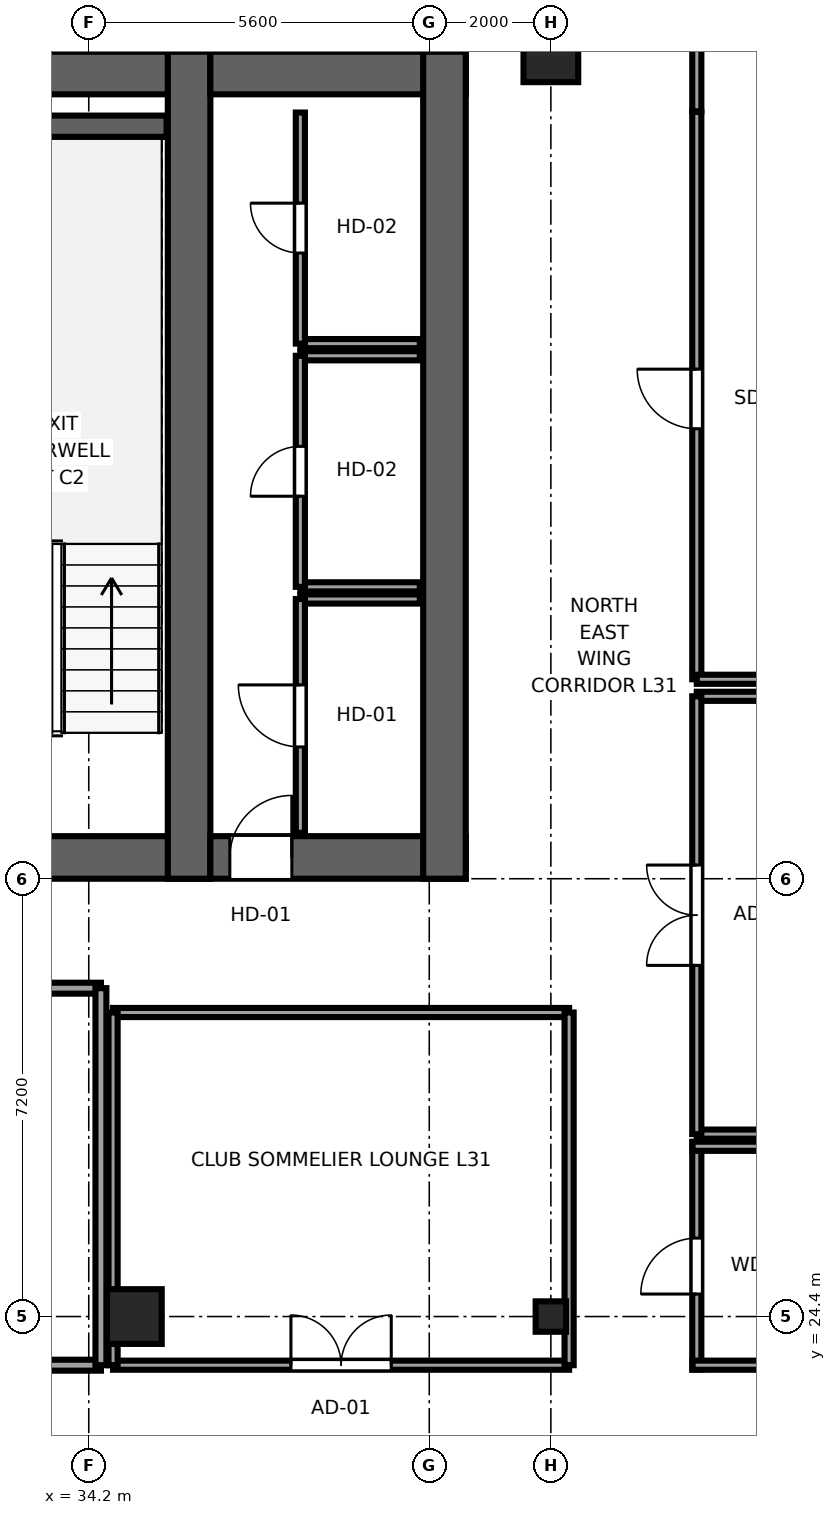
"""IFC4 building model, lengths in metres.
Left out: names, types, materials, properties, quantities, classifications, styles, units other than length and angle.
Written with IfcOpenShell. Run it as: python <this file> out.ifc"""

import sys

from ifc_helpers import new_model, si_unit, direction, frame, frame_2d, origin, origin_2d, place, context, subcontext, project, spatial, rectangle, i_section, extrude, source, transform, mapped, element, fill, save


model = new_model("IFC4")
c1 = context("Model", 3, precision=1e-05, world=origin(), true_north=direction((0.0, 1.0)))
c2 = subcontext(c1, "Body", "Model", "MODEL_VIEW")
j1 = project(units=[si_unit("LENGTHUNIT", "METRE"), si_unit("PLANEANGLEUNIT", "RADIAN")], contexts=[c1])
p1 = place(None, origin())
s1 = spatial("IfcSite", under=j1, at=p1, CompositionType="ELEMENT")
p2 = place(p1, origin())
s2 = spatial("IfcBuilding", under=s1, at=p2, CompositionType="ELEMENT")
p3 = place(p2, frame((0.0, 0.0, 122.2)))
s3 = spatial("IfcBuildingStorey", under=s2, at=p3, CompositionType="ELEMENT", Elevation=122.2)
p4 = place(p3, frame((9.8, 31.95, 0.0), z_axis=(0.0, 0.0, 1.0), x_axis=(1.0, 0.0, 0.0)))
e1 = element("IfcWall", 1, at=p4, inside=s3, PredefinedType="SHEAR", context=c2, shape_type="SweptSolid", body=[
    extrude(rectangle(XDim=26.4, YDim=0.7, at=frame_2d((13.2, 0.0))), origin(), (0.0, 0.0, 1.0), 3.55),
])
p5 = place(p4, frame((6.32, 0.0, 0.0), z_axis=(0.0, 0.0, 1.0), x_axis=(-1.0, 0.0, 0.0)))
e2 = element("IfcOpeningElement", 2, at=p5, cuts=e1, PredefinedType="OPENING", context=c2, shape_type="SweptSolid", body=[
    extrude(rectangle(XDim=1.5, YDim=2.04, at=frame_2d((0.75, 1.02))), frame((0.0, 0.36, 0.0), z_axis=(0.0, -1.0, 0.0), x_axis=(1.0, 0.0, 0.0)), (0.0, 0.0, 1.0), 0.72),
])
p6 = place(p4, frame((13.95, 0.0, 0.0), z_axis=(0.0, 0.0, 1.0), x_axis=(-1.0, 0.0, 0.0)))
e3 = element("IfcOpeningElement", 3, at=p6, cuts=e1, PredefinedType="OPENING", context=c2, shape_type="SweptSolid", body=[
    extrude(rectangle(XDim=1.5, YDim=2.04, at=frame_2d((0.75, 1.02))), frame((0.0, 0.36, 0.0), z_axis=(0.0, -1.0, 0.0), x_axis=(1.0, 0.0, 0.0)), (0.0, 0.0, 1.0), 0.72),
])
p7 = place(p4, frame((20.25, 0.0, 0.0), z_axis=(0.0, 0.0, 1.0), x_axis=(-1.0, 0.0, 0.0)))
e4 = element("IfcOpeningElement", 4, at=p7, cuts=e1, PredefinedType="OPENING", context=c2, shape_type="SweptSolid", body=[
    extrude(rectangle(XDim=1.5, YDim=2.04, at=frame_2d((0.75, 1.02))), frame((0.0, 0.36, 0.0), z_axis=(0.0, -1.0, 0.0), x_axis=(1.0, 0.0, 0.0)), (0.0, 0.0, 1.0), 0.72),
])
p8 = place(p4, frame((8.37, 0.0, 0.0), z_axis=(0.0, 0.0, 1.0), x_axis=(-1.0, 0.0, 0.0)))
e5 = element("IfcOpeningElement", 5, at=p8, cuts=e1, PredefinedType="OPENING", context=c2, shape_type="SweptSolid", body=[
    extrude(rectangle(XDim=0.82, YDim=2.01, at=frame_2d((0.41, 1.005))), frame((0.0, 0.36, 0.0), z_axis=(0.0, -1.0, 0.0), x_axis=(1.0, 0.0, 0.0)), (0.0, 0.0, 1.0), 0.72),
])
p9 = place(p3, frame((9.8, 44.85, 0.0), z_axis=(0.0, 0.0, 1.0), x_axis=(1.0, 0.0, 0.0)))
e6 = element("IfcWall", 6, at=p9, inside=s3, PredefinedType="SHEAR", context=c2, shape_type="SweptSolid", body=[
    extrude(rectangle(XDim=26.4, YDim=0.7, at=frame_2d((13.2, 0.0))), origin(), (0.0, 0.0, 1.0), 3.55),
])
p10 = place(p3, frame((35.85, 31.6, 0.0), z_axis=(0.0, 0.0, 1.0), x_axis=(0.0, 1.0, 0.0)))
e7 = element("IfcWall", 7, at=p10, inside=s3, PredefinedType="SHEAR", context=c2, shape_type="SweptSolid", body=[
    extrude(rectangle(XDim=13.6, YDim=0.7, at=frame_2d((6.8, 0.0))), origin(), (0.0, 0.0, 1.0), 3.55),
])
p11 = place(p3, frame((36.2, 31.95, 0.0), z_axis=(0.0, 0.0, 1.0), x_axis=(1.0, 0.0, 0.0)))
e8 = element("IfcWall", 8, at=p11, inside=s3, PredefinedType="SHEAR", context=c2, shape_type="SweptSolid", body=[
    extrude(rectangle(XDim=4.2, YDim=0.7, at=frame_2d((2.1, 0.0))), origin(), (0.0, 0.0, 1.0), 3.55),
])
p12 = place(p11, frame((1.34, 0.0, 0.0), z_axis=(0.0, 0.0, 1.0), x_axis=(-1.0, 0.0, 0.0)))
e9 = element("IfcOpeningElement", 9, at=p12, cuts=e8, PredefinedType="OPENING", context=c2, shape_type="SweptSolid", body=[
    extrude(rectangle(XDim=1.02, YDim=2.03, at=frame_2d((0.51, 1.015))), frame((0.0, 0.36, 0.0), z_axis=(0.0, -1.0, 0.0), x_axis=(1.0, 0.0, 0.0)), (0.0, 0.0, 1.0), 0.72),
])
p13 = place(p3, frame((36.2, 44.85, 0.0), z_axis=(0.0, 0.0, 1.0), x_axis=(1.0, 0.0, 0.0)))
e10 = element("IfcWall", 10, at=p13, inside=s3, PredefinedType="SHEAR", context=c2, shape_type="SweptSolid", body=[
    extrude(rectangle(XDim=4.2, YDim=0.7, at=frame_2d((2.1, 0.0))), origin(), (0.0, 0.0, 1.0), 3.55),
])
p14 = place(p3, frame((40.05, 31.6, 0.0), z_axis=(0.0, 0.0, 1.0), x_axis=(0.0, 1.0, 0.0)))
e11 = element("IfcWall", 11, at=p14, inside=s3, PredefinedType="SHEAR", context=c2, shape_type="SweptSolid", body=[
    extrude(rectangle(XDim=13.6, YDim=0.7, at=frame_2d((6.8, 0.0))), origin(), (0.0, 0.0, 1.0), 3.55),
])
p15 = place(p3, frame((31.88, 43.975, 0.0), z_axis=(0.0, 0.0, 1.0), x_axis=(1.0, 0.0, 0.0)))
e12 = element("IfcWall", 12, at=p15, inside=s3, PredefinedType="SHEAR", context=c2, shape_type="SweptSolid", body=[
    extrude(rectangle(XDim=3.6, YDim=0.35, at=frame_2d((1.8, 0.0))), origin(), (0.0, 0.0, 1.0), 3.55),
])
m1 = source(origin(), c2, "Body", "SweptSolid", [
    extrude(rectangle(XDim=0.9, YDim=0.9, at=origin_2d()), origin(), (0.0, 0.0, 1.0), 3.55),
])
p16 = place(p3, frame((34.95, 24.4, 0.0), z_axis=(0.0, 0.0, 1.0), x_axis=(1.0, 0.0, 0.0)))
e13 = element("IfcColumn", 13, at=p16, inside=s3, PredefinedType="COLUMN", context=c2, shape_type="MappedRepresentation", body=[
    mapped(m1, transform((0.0, 0.0, 0.0), x_axis=(1.0, 0.0, 0.0), y_axis=(0.0, 1.0, 0.0), z_axis=(0.0, 0.0, 1.0), scale=1.0)),
])
m2 = source(origin(), c2, "Body", "SweptSolid", [
    extrude(i_section(OverallWidth=0.5, OverallDepth=0.5, WebThickness=0.022, FlangeThickness=0.034, at=origin_2d()), origin(), (0.0, 0.0, 1.0), 3.55),
])
p17 = place(p3, frame((41.8, 24.4, 0.0), z_axis=(0.0, 0.0, 1.0), x_axis=(1.0, 0.0, 0.0)))
e14 = element("IfcColumn", 14, at=p17, inside=s3, PredefinedType="COLUMN", context=c2, shape_type="MappedRepresentation", body=[
    mapped(m2, transform((0.0, 0.0, 0.0), x_axis=(1.0, 0.0, 0.0), y_axis=(0.0, 1.0, 0.0), z_axis=(0.0, 0.0, 1.0), scale=1.0)),
])
p18 = place(p3, frame((41.8, 45.15, 0.0), z_axis=(0.0, 0.0, 1.0), x_axis=(1.0, 0.0, 0.0)))
e15 = element("IfcColumn", 15, at=p18, inside=s3, PredefinedType="COLUMN", context=c2, shape_type="MappedRepresentation", body=[
    mapped(m1, transform((0.0, 0.0, 0.0), x_axis=(1.0, 0.0, 0.0), y_axis=(0.0, 1.0, 0.0), z_axis=(0.0, 0.0, 1.0), scale=1.0)),
])
p19 = place(p3, frame((37.68, 36.2, 0.0), z_axis=(0.0, 0.0, 1.0), x_axis=(1.0, 0.0, 0.0)))
e16 = element("IfcWall", 16, at=p19, inside=s3, PredefinedType="PARTITIONING", context=c2, shape_type="SweptSolid", body=[
    extrude(rectangle(XDim=1.965, YDim=0.15, at=frame_2d((0.982, 0.0))), origin(), (0.0, 0.0, 1.0), 3.37),
])
p20 = place(p3, frame((37.68, 32.355, 0.0), z_axis=(0.0, 0.0, 1.0), x_axis=(0.0, 1.0, 0.0)))
e17 = element("IfcWall", 17, at=p20, inside=s3, PredefinedType="PARTITIONING", context=c2, shape_type="SweptSolid", body=[
    extrude(rectangle(XDim=3.845, YDim=0.15, at=frame_2d((1.922, 0.0))), origin(), (0.0, 0.0, 1.0), 3.37),
])
p21 = place(p20, frame((1.413, 0.0, 0.0)))
e18 = element("IfcOpeningElement", 18, at=p21, cuts=e17, PredefinedType="OPENING", context=c2, shape_type="SweptSolid", body=[
    extrude(rectangle(XDim=1.02, YDim=2.03, at=frame_2d((0.51, 1.015))), frame((0.0, 0.085, 0.0), z_axis=(0.0, -1.0, 0.0), x_axis=(1.0, 0.0, 0.0)), (0.0, 0.0, 1.0), 0.17),
])
for number, where, z_axis, x_axis in (
    (19, (37.68, 36.4, 0.0), (0.0, 0.0, 1.0), (1.0, 0.0, 0.0)),
    (20, (37.68, 40.2, 0.0), (0.0, 0.0, 1.0), (1.0, 0.0, 0.0)),
):
    element("IfcWall", number, at=place(p3, frame(where, z_axis=z_axis, x_axis=x_axis)), inside=s3, PredefinedType="PARTITIONING", context=c2, shape_type="SweptSolid", body=[
        extrude(rectangle(XDim=1.965, YDim=0.15, at=frame_2d((0.982, 0.0))), origin(), (0.0, 0.0, 1.0), 3.37),
    ])
p22 = place(p3, frame((37.68, 36.4, 0.0), z_axis=(0.0, 0.0, 1.0), x_axis=(0.0, 1.0, 0.0)))
e21 = element("IfcWall", 21, at=p22, inside=s3, PredefinedType="PARTITIONING", context=c2, shape_type="SweptSolid", body=[
    extrude(rectangle(XDim=3.8, YDim=0.15, at=frame_2d((1.9, 0.0))), origin(), (0.0, 0.0, 1.0), 3.37),
])
p23 = place(p22, frame((1.49, 0.0, 0.0)))
e22 = element("IfcOpeningElement", 22, at=p23, cuts=e21, PredefinedType="OPENING", context=c2, shape_type="SweptSolid", body=[
    extrude(rectangle(XDim=0.82, YDim=2.01, at=frame_2d((0.41, 1.005))), frame((0.0, 0.085, 0.0), z_axis=(0.0, -1.0, 0.0), x_axis=(1.0, 0.0, 0.0)), (0.0, 0.0, 1.0), 0.17),
])
p24 = place(p3, frame((37.68, 40.4, 0.0), z_axis=(0.0, 0.0, 1.0), x_axis=(1.0, 0.0, 0.0)))
e23 = element("IfcWall", 23, at=p24, inside=s3, PredefinedType="PARTITIONING", context=c2, shape_type="SweptSolid", body=[
    extrude(rectangle(XDim=1.965, YDim=0.15, at=frame_2d((0.982, 0.0))), origin(), (0.0, 0.0, 1.0), 3.37),
])
p25 = place(p3, frame((37.68, 40.4, 0.0), z_axis=(0.0, 0.0, 1.0), x_axis=(0.0, 1.0, 0.0)))
e24 = element("IfcWall", 24, at=p25, inside=s3, PredefinedType="PARTITIONING", context=c2, shape_type="SweptSolid", body=[
    extrude(rectangle(XDim=3.8, YDim=0.15, at=frame_2d((1.9, 0.0))), origin(), (0.0, 0.0, 1.0), 3.37),
])
p26 = place(p25, frame((1.49, 0.0, 0.0)))
e25 = element("IfcOpeningElement", 25, at=p26, cuts=e24, PredefinedType="OPENING", context=c2, shape_type="SweptSolid", body=[
    extrude(rectangle(XDim=0.82, YDim=2.01, at=frame_2d((0.41, 1.005))), frame((0.0, 0.085, 0.0), z_axis=(0.0, -1.0, 0.0), x_axis=(1.0, 0.0, 0.0)), (0.0, 0.0, 1.0), 0.17),
])
p27 = place(p3, frame((44.2, 23.53, 0.0), z_axis=(0.0, 0.0, 1.0), x_axis=(0.0, 1.0, 0.0)))
e26 = element("IfcWall", 26, at=p27, inside=s3, PredefinedType="PARTITIONING", context=c2, shape_type="SweptSolid", body=[
    extrude(rectangle(XDim=3.74, YDim=0.15, at=frame_2d((1.87, 0.0))), origin(), (0.0, 0.0, 1.0), 3.37),
])
p28 = place(p27, frame((1.24, 0.0, 0.0)))
e27 = element("IfcOpeningElement", 27, at=p28, cuts=e26, PredefinedType="OPENING", context=c2, shape_type="SweptSolid", body=[
    extrude(rectangle(XDim=0.92, YDim=2.01, at=frame_2d((0.46, 1.005))), frame((0.0, 0.085, 0.0), z_axis=(0.0, -1.0, 0.0), x_axis=(1.0, 0.0, 0.0)), (0.0, 0.0, 1.0), 0.17),
])
for number, where, z_axis, x_axis in (
    (28, (44.13, 23.6, 0.0), (0.0, 0.0, 1.0), (1.0, 0.0, 0.0)),
    (29, (44.13, 27.2, 0.0), (0.0, 0.0, 1.0), (1.0, 0.0, 0.0)),
):
    element("IfcWall", number, at=place(p3, frame(where, z_axis=z_axis, x_axis=x_axis)), inside=s3, PredefinedType="PARTITIONING", context=c2, shape_type="SweptSolid", body=[
        extrude(rectangle(XDim=4.54, YDim=0.15, at=frame_2d((2.27, 0.0))), origin(), (0.0, 0.0, 1.0), 3.37),
    ])
for number, where, z_axis, x_axis in (
    (30, (44.2, 27.4, 0.0), (0.0, 0.0, 1.0), (1.0, 0.0, 0.0)),
    (31, (44.2, 34.6, 0.0), (0.0, 0.0, 1.0), (1.0, 0.0, 0.0)),
):
    element("IfcWall", number, at=place(p3, frame(where, z_axis=z_axis, x_axis=x_axis)), inside=s3, PredefinedType="PARTITIONING", context=c2, shape_type="SweptSolid", body=[
        extrude(rectangle(XDim=12.5, YDim=0.15, at=frame_2d((6.25, 0.0))), origin(), (0.0, 0.0, 1.0), 3.37),
    ])
p29 = place(p3, frame((44.2, 27.4, 0.0), z_axis=(0.0, 0.0, 1.0), x_axis=(0.0, 1.0, 0.0)))
e32 = element("IfcWall", 32, at=p29, inside=s3, PredefinedType="PARTITIONING", context=c2, shape_type="SweptSolid", body=[
    extrude(rectangle(XDim=7.2, YDim=0.15, at=frame_2d((3.6, 0.0))), origin(), (0.0, 0.0, 1.0), 3.37),
])
p30 = place(p29, frame((2.775, 0.0, 0.0)))
e33 = element("IfcOpeningElement", 33, at=p30, cuts=e32, PredefinedType="OPENING", context=c2, shape_type="SweptSolid", body=[
    extrude(rectangle(XDim=1.65, YDim=2.15, at=frame_2d((0.825, 1.075))), frame((0.0, 0.085, 0.0), z_axis=(0.0, -1.0, 0.0), x_axis=(1.0, 0.0, 0.0)), (0.0, 0.0, 1.0), 0.17),
])
p31 = place(p3, frame((44.2, 34.88, 0.0), z_axis=(0.0, 0.0, 1.0), x_axis=(0.0, 1.0, 0.0)))
e34 = element("IfcWall", 34, at=p31, inside=s3, PredefinedType="PARTITIONING", context=c2, shape_type="SweptSolid", body=[
    extrude(rectangle(XDim=9.33, YDim=0.15, at=frame_2d((4.665, 0.0))), origin(), (0.0, 0.0, 1.0), 3.37),
])
p32 = place(p31, frame((4.12, 0.0, 0.0)))
e35 = element("IfcOpeningElement", 35, at=p32, cuts=e34, PredefinedType="OPENING", context=c2, shape_type="SweptSolid", body=[
    extrude(rectangle(XDim=0.98, YDim=2.12, at=frame_2d((0.49, 1.06))), frame((0.0, 0.085, 0.0), z_axis=(0.0, -1.0, 0.0), x_axis=(1.0, 0.0, 0.0)), (0.0, 0.0, 1.0), 0.17),
])
p33 = place(p3, frame((44.2, 34.88, 0.0), z_axis=(0.0, 0.0, 1.0), x_axis=(1.0, 0.0, 0.0)))
e36 = element("IfcWall", 36, at=p33, inside=s3, PredefinedType="PARTITIONING", context=c2, shape_type="SweptSolid", body=[
    extrude(rectangle(XDim=10.03, YDim=0.15, at=frame_2d((5.015, 0.0))), origin(), (0.0, 0.0, 1.0), 3.37),
])
p34 = place(p3, frame((44.2, 44.22, 0.0), z_axis=(0.0, 0.0, 1.0), x_axis=(0.0, 1.0, 0.0)))
e37 = element("IfcWall", 37, at=p34, inside=s3, PredefinedType="PARTITIONING", context=c2, shape_type="SweptSolid", body=[
    extrude(rectangle(XDim=1.375, YDim=0.15, at=frame_2d((0.688, 0.0))), origin(), (0.0, 0.0, 1.0), 3.37),
])
p35 = place(p3, frame((27.1, 23.6, 0.0), z_axis=(0.0, 0.0, 1.0), x_axis=(1.0, 0.0, 0.0)))
e38 = element("IfcWall", 38, at=p35, inside=s3, PredefinedType="PARTITIONING", context=c2, shape_type="SweptSolid", body=[
    extrude(rectangle(XDim=7.3, YDim=0.18, at=frame_2d((3.65, 0.0))), origin(), (0.0, 0.0, 1.0), 3.37),
])
p36 = place(p35, frame((2.825, 0.0, 0.0)))
e39 = element("IfcOpeningElement", 39, at=p36, cuts=e38, PredefinedType="OPENING", context=c2, shape_type="SweptSolid", body=[
    extrude(rectangle(XDim=1.65, YDim=2.15, at=frame_2d((0.825, 1.075))), frame((0.0, 0.1, 0.0), z_axis=(0.0, -1.0, 0.0), x_axis=(1.0, 0.0, 0.0)), (0.0, 0.0, 1.0), 0.2),
])
p37 = place(p3, frame((27.1, 29.8, 0.0), z_axis=(0.0, 0.0, 1.0), x_axis=(1.0, 0.0, 0.0)))
e40 = element("IfcWall", 40, at=p37, inside=s3, PredefinedType="PARTITIONING", context=c2, shape_type="SweptSolid", body=[
    extrude(rectangle(XDim=7.3, YDim=0.18, at=frame_2d((3.65, 0.0))), origin(), (0.0, 0.0, 1.0), 3.37),
])
p38 = place(p3, frame((34.4, 23.6, 0.0), z_axis=(0.0, 0.0, 1.0), x_axis=(0.0, 1.0, 0.0)))
e41 = element("IfcWall", 41, at=p38, inside=s3, PredefinedType="PARTITIONING", context=c2, shape_type="SweptSolid", body=[
    extrude(rectangle(XDim=6.2, YDim=0.18, at=frame_2d((3.1, 0.0))), origin(), (0.0, 0.0, 1.0), 3.37),
])
p39 = place(p3, frame((34.6, 23.6, 0.0), z_axis=(0.0, 0.0, 1.0), x_axis=(1.0, 0.0, 0.0)))
e42 = element("IfcWall", 42, at=p39, inside=s3, PredefinedType="PARTITIONING", context=c2, shape_type="SweptSolid", body=[
    extrude(rectangle(XDim=7.5, YDim=0.15, at=frame_2d((3.75, 0.0))), origin(), (0.0, 0.0, 1.0), 3.37),
])
p40 = place(p39, frame((2.925, 0.0, 0.0)))
e43 = element("IfcOpeningElement", 43, at=p40, cuts=e42, PredefinedType="OPENING", context=c2, shape_type="SweptSolid", body=[
    extrude(rectangle(XDim=1.65, YDim=2.15, at=frame_2d((0.825, 1.075))), frame((0.0, 0.085, 0.0), z_axis=(0.0, -1.0, 0.0), x_axis=(1.0, 0.0, 0.0)), (0.0, 0.0, 1.0), 0.17),
])
p41 = place(p3, frame((34.6, 29.4, 0.0), z_axis=(0.0, 0.0, 1.0), x_axis=(1.0, 0.0, 0.0)))
e44 = element("IfcWall", 44, at=p41, inside=s3, PredefinedType="PARTITIONING", context=c2, shape_type="SweptSolid", body=[
    extrude(rectangle(XDim=7.5, YDim=0.15, at=frame_2d((3.75, 0.0))), origin(), (0.0, 0.0, 1.0), 3.37),
])
p42 = place(p3, frame((34.6, 23.6, 0.0), z_axis=(0.0, 0.0, 1.0), x_axis=(0.0, 1.0, 0.0)))
e45 = element("IfcWall", 45, at=p42, inside=s3, PredefinedType="PARTITIONING", context=c2, shape_type="SweptSolid", body=[
    extrude(rectangle(XDim=5.8, YDim=0.15, at=frame_2d((2.9, 0.0))), origin(), (0.0, 0.0, 1.0), 3.37),
])
p43 = place(p3, frame((42.1, 23.6, 0.0), z_axis=(0.0, 0.0, 1.0), x_axis=(0.0, 1.0, 0.0)))
e46 = element("IfcWall", 46, at=p43, inside=s3, PredefinedType="PARTITIONING", context=c2, shape_type="SweptSolid", body=[
    extrude(rectangle(XDim=5.8, YDim=0.15, at=frame_2d((2.9, 0.0))), origin(), (0.0, 0.0, 1.0), 2.16),
])
m3 = source(origin(), c2, "Body", "SweptSolid", [
    extrude(rectangle(XDim=1.02, YDim=2.03, at=frame_2d((0.51, 1.015))), frame((0.0, 0.025, 0.0), z_axis=(0.0, -1.0, 0.0), x_axis=(1.0, 0.0, 0.0)), (0.0, 0.0, 1.0), 0.05),
])
p44 = place(p12, origin())
e47 = element("IfcDoor", 47, at=p44, inside=s3, OperationType="SINGLE_SWING_RIGHT", PredefinedType="DOOR", context=c2, shape_type="MappedRepresentation", body=[
    mapped(m3, transform((0.0, 0.0, 0.0), x_axis=(1.0, 0.0, 0.0), y_axis=(0.0, 1.0, 0.0), z_axis=(0.0, 0.0, 1.0), scale=1.0)),
])
fill(e9, e47)
p45 = place(p21, origin())
e48 = element("IfcDoor", 48, at=p45, inside=s3, OperationType="SINGLE_SWING_RIGHT", PredefinedType="DOOR", context=c2, shape_type="MappedRepresentation", body=[
    mapped(m3, transform((0.0, 0.0, 0.0), x_axis=(1.0, 0.0, 0.0), y_axis=(0.0, 1.0, 0.0), z_axis=(0.0, 0.0, 1.0), scale=1.0)),
])
fill(e18, e48)
m4 = source(origin(), c2, "Body", "SweptSolid", [
    extrude(rectangle(XDim=0.82, YDim=2.01, at=frame_2d((0.41, 1.005))), frame((0.0, 0.025, 0.0), z_axis=(0.0, -1.0, 0.0), x_axis=(1.0, 0.0, 0.0)), (0.0, 0.0, 1.0), 0.05),
])
p46 = place(p23, origin())
e49 = element("IfcDoor", 49, at=p46, inside=s3, OperationType="SINGLE_SWING_LEFT", PredefinedType="DOOR", context=c2, shape_type="MappedRepresentation", body=[
    mapped(m4, transform((0.0, 0.0, 0.0), x_axis=(1.0, 0.0, 0.0), y_axis=(0.0, 1.0, 0.0), z_axis=(0.0, 0.0, 1.0), scale=1.0)),
])
fill(e22, e49)
p47 = place(p26, origin())
e50 = element("IfcDoor", 50, at=p47, inside=s3, OperationType="SINGLE_SWING_RIGHT", PredefinedType="DOOR", context=c2, shape_type="MappedRepresentation", body=[
    mapped(m4, transform((0.0, 0.0, 0.0), x_axis=(1.0, 0.0, 0.0), y_axis=(0.0, 1.0, 0.0), z_axis=(0.0, 0.0, 1.0), scale=1.0)),
])
fill(e25, e50)
m5 = source(origin(), c2, "Body", "SweptSolid", [
    extrude(rectangle(XDim=0.92, YDim=2.01, at=frame_2d((0.46, 1.005))), frame((0.0, 0.025, 0.0), z_axis=(0.0, -1.0, 0.0), x_axis=(1.0, 0.0, 0.0)), (0.0, 0.0, 1.0), 0.05),
])
p48 = place(p28, origin())
e51 = element("IfcDoor", 51, at=p48, inside=s3, OperationType="SINGLE_SWING_LEFT", PredefinedType="DOOR", context=c2, shape_type="MappedRepresentation", body=[
    mapped(m5, transform((0.0, 0.0, 0.0), x_axis=(1.0, 0.0, 0.0), y_axis=(0.0, 1.0, 0.0), z_axis=(0.0, 0.0, 1.0), scale=1.0)),
])
fill(e27, e51)
m6 = source(origin(), c2, "Body", "SweptSolid", [
    extrude(rectangle(XDim=1.65, YDim=2.15, at=frame_2d((0.825, 1.075))), frame((0.0, 0.025, 0.0), z_axis=(0.0, -1.0, 0.0), x_axis=(1.0, 0.0, 0.0)), (0.0, 0.0, 1.0), 0.05),
])
p49 = place(p30, origin())
e52 = element("IfcDoor", 52, at=p49, inside=s3, OperationType="DOUBLE_DOOR_SINGLE_SWING", PredefinedType="DOOR", context=c2, shape_type="MappedRepresentation", body=[
    mapped(m6, transform((0.0, 0.0, 0.0), x_axis=(1.0, 0.0, 0.0), y_axis=(0.0, 1.0, 0.0), z_axis=(0.0, 0.0, 1.0), scale=1.0)),
])
fill(e33, e52)
m7 = source(origin(), c2, "Body", "SweptSolid", [
    extrude(rectangle(XDim=0.98, YDim=2.12, at=frame_2d((0.49, 1.06))), frame((0.0, 0.025, 0.0), z_axis=(0.0, -1.0, 0.0), x_axis=(1.0, 0.0, 0.0)), (0.0, 0.0, 1.0), 0.05),
])
p50 = place(p32, origin())
e53 = element("IfcDoor", 53, at=p50, inside=s3, OperationType="SINGLE_SWING_RIGHT", PredefinedType="DOOR", context=c2, shape_type="MappedRepresentation", body=[
    mapped(m7, transform((0.0, 0.0, 0.0), x_axis=(1.0, 0.0, 0.0), y_axis=(0.0, 1.0, 0.0), z_axis=(0.0, 0.0, 1.0), scale=1.0)),
])
fill(e35, e53)
p51 = place(p40, origin())
e54 = element("IfcDoor", 54, at=p51, inside=s3, OperationType="DOUBLE_DOOR_SINGLE_SWING", PredefinedType="DOOR", context=c2, shape_type="MappedRepresentation", body=[
    mapped(m6, transform((0.0, 0.0, 0.0), x_axis=(1.0, 0.0, 0.0), y_axis=(0.0, 1.0, 0.0), z_axis=(0.0, 0.0, 1.0), scale=1.0)),
])
fill(e43, e54)
save(model, sys.argv[1])
